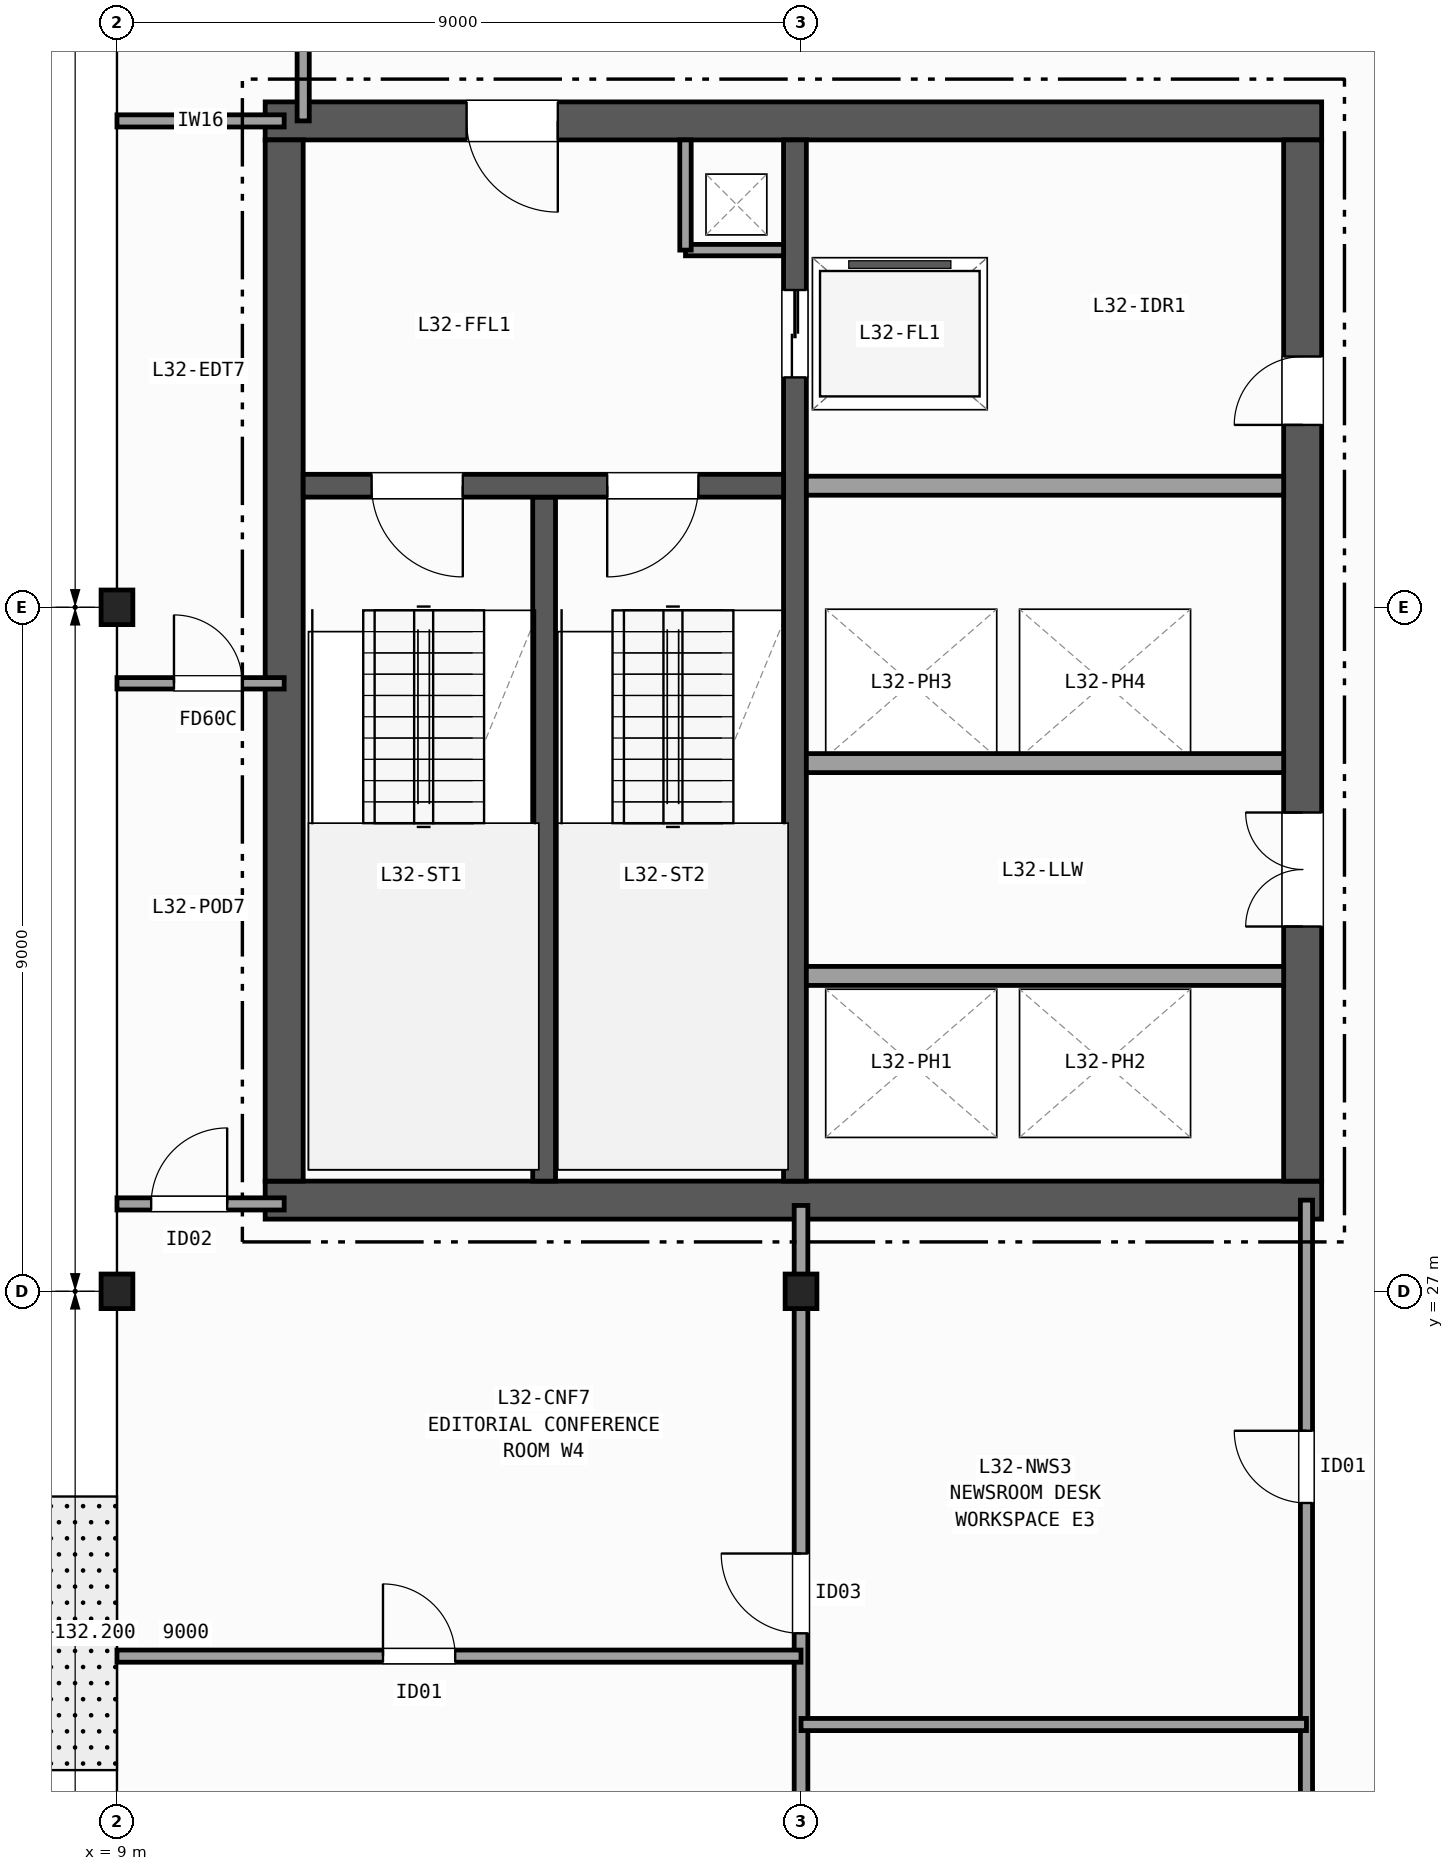
"""IFC4 building model, lengths in metres.
Left out: names, types, materials, properties, quantities, classifications, styles, units other than length and angle.
Written with IfcOpenShell. Run it as: python <this file> out.ifc"""

import sys

from ifc_helpers import new_model, si_unit, direction, frame, frame_2d, origin, origin_2d, place, context, subcontext, project, spatial, rectangle, i_section, extrude, element, fill, save


model = new_model("IFC4")
c1 = context("Model", 3, precision=1e-05, world=origin(), true_north=direction((0.0, 1.0)))
c2 = subcontext(c1, "Body", "Model", "MODEL_VIEW")
j1 = project(units=[si_unit("LENGTHUNIT", "METRE"), si_unit("PLANEANGLEUNIT", "RADIAN")], contexts=[c1])
p1 = place(None, origin())
s1 = spatial("IfcSite", under=j1, at=p1, CompositionType="ELEMENT")
p2 = place(p1, origin())
s2 = spatial("IfcBuilding", under=s1, at=p2, CompositionType="ELEMENT")
p3 = place(p2, frame((0.0, 0.0, 132.2)))
s3 = spatial("IfcBuildingStorey", under=s2, at=p3, CompositionType="ELEMENT", Elevation=132.2)
for number, where, z_axis, x_axis in (
    (1, (9.0, 27.0, 0.0), (0.0, 0.0, 1.0), (1.0, 0.0, 0.0)),
    (2, (9.0, 36.0, 0.0), (0.0, 0.0, 1.0), (1.0, 0.0, 0.0)),
    (3, (18.0, 27.0, 0.0), (0.0, 0.0, 1.0), (1.0, 0.0, 0.0)),
):
    element("IfcColumn", number, at=place(p3, frame(where, z_axis=z_axis, x_axis=x_axis)), inside=s3, PredefinedType="COLUMN", context=c2, shape_type="SweptSolid", body=[
        extrude(i_section(OverallWidth=0.418, OverallDepth=0.455, WebThickness=0.042, FlangeThickness=0.068, FilletRadius=0.015, at=origin_2d()), origin(), (0.0, 0.0, 1.0), 3.7),
    ])
p4 = place(p3, frame((10.95, 28.2, 0.0), z_axis=(0.0, 0.0, 1.0), x_axis=(1.0, 0.0, 0.0)))
e4 = element("IfcWall", 4, at=p4, inside=s3, PredefinedType="SHEAR", context=c2, shape_type="SweptSolid", body=[
    extrude(rectangle(XDim=13.9, YDim=0.5, at=frame_2d((6.95, 0.0))), origin(), (0.0, 0.0, 1.0), 3.42),
])
p5 = place(p3, frame((24.85, 42.4, 0.0), z_axis=(0.0, 0.0, 1.0), x_axis=(-1.0, 0.0, 0.0)))
e5 = element("IfcWall", 5, at=p5, inside=s3, PredefinedType="SHEAR", context=c2, shape_type="SweptSolid", body=[
    extrude(rectangle(XDim=13.9, YDim=0.5, at=frame_2d((6.95, 0.0))), origin(), (0.0, 0.0, 1.0), 3.42),
])
p6 = place(p5, frame((10.05, 0.0, 0.0)))
e6 = element("IfcOpeningElement", 6, at=p6, cuts=e5, PredefinedType="OPENING", context=c2, shape_type="SweptSolid", body=[
    extrude(rectangle(XDim=1.2, YDim=2.15, at=frame_2d((0.6, 1.075))), frame((0.0, 0.26, 0.0), z_axis=(0.0, -1.0, 0.0), x_axis=(1.0, 0.0, 0.0)), (0.0, 0.0, 1.0), 0.52),
])
p7 = place(p3, frame((11.2, 42.15, 0.0), z_axis=(0.0, 0.0, 1.0), x_axis=(0.0, -1.0, 0.0)))
e7 = element("IfcWall", 7, at=p7, inside=s3, PredefinedType="SHEAR", context=c2, shape_type="SweptSolid", body=[
    extrude(rectangle(XDim=13.7, YDim=0.5, at=frame_2d((6.85, 0.0))), origin(), (0.0, 0.0, 1.0), 3.42),
])
p8 = place(p3, frame((24.6, 28.45, 0.0), z_axis=(0.0, 0.0, 1.0), x_axis=(0.0, 1.0, 0.0)))
e8 = element("IfcWall", 8, at=p8, inside=s3, PredefinedType="SHEAR", context=c2, shape_type="SweptSolid", body=[
    extrude(rectangle(XDim=13.7, YDim=0.5, at=frame_2d((6.85, 0.0))), origin(), (0.0, 0.0, 1.0), 3.42),
])
p9 = place(p8, frame((3.35, 0.0, 0.0)))
e9 = element("IfcOpeningElement", 9, at=p9, cuts=e8, PredefinedType="OPENING", context=c2, shape_type="SweptSolid", body=[
    extrude(rectangle(XDim=1.5, YDim=2.2, at=frame_2d((0.75, 1.1))), frame((0.0, 0.26, 0.0), z_axis=(0.0, -1.0, 0.0), x_axis=(1.0, 0.0, 0.0)), (0.0, 0.0, 1.0), 0.52),
])
p10 = place(p8, frame((9.95, 0.0, 0.0)))
e10 = element("IfcOpeningElement", 10, at=p10, cuts=e8, PredefinedType="OPENING", context=c2, shape_type="SweptSolid", body=[
    extrude(rectangle(XDim=0.9, YDim=2.1, at=frame_2d((0.45, 1.05))), frame((0.0, 0.26, 0.0), z_axis=(0.0, -1.0, 0.0), x_axis=(1.0, 0.0, 0.0)), (0.0, 0.0, 1.0), 0.52),
])
p11 = place(p3, frame((14.62, 28.45, 0.0), z_axis=(0.0, 0.0, 1.0), x_axis=(0.0, 1.0, 0.0)))
e11 = element("IfcWall", 11, at=p11, inside=s3, PredefinedType="SHEAR", context=c2, shape_type="SweptSolid", body=[
    extrude(rectangle(XDim=9.0, YDim=0.3, at=frame_2d((4.5, 0.0))), origin(), (0.0, 0.0, 1.0), 3.42),
])
p12 = place(p3, frame((17.92, 42.15, 0.0), z_axis=(0.0, 0.0, 1.0), x_axis=(0.0, -1.0, 0.0)))
e12 = element("IfcWall", 12, at=p12, inside=s3, PredefinedType="SHEAR", context=c2, shape_type="SweptSolid", body=[
    extrude(rectangle(XDim=13.7, YDim=0.3, at=frame_2d((6.85, 0.0))), origin(), (0.0, 0.0, 1.0), 3.42),
])
p13 = place(p12, frame((1.975, 0.0, 0.0)))
e13 = element("IfcOpeningElement", 13, at=p13, cuts=e12, PredefinedType="OPENING", context=c2, shape_type="SweptSolid", body=[
    extrude(rectangle(XDim=1.15, YDim=2.15, at=frame_2d((0.575, 1.075))), frame((0.0, 0.16, 0.0), z_axis=(0.0, -1.0, 0.0), x_axis=(1.0, 0.0, 0.0)), (0.0, 0.0, 1.0), 0.32),
])
p14 = place(p3, frame((17.77, 37.6, 0.0), z_axis=(0.0, 0.0, 1.0), x_axis=(-1.0, 0.0, 0.0)))
e14 = element("IfcWall", 14, at=p14, inside=s3, PredefinedType="SHEAR", context=c2, shape_type="SweptSolid", body=[
    extrude(rectangle(XDim=6.32, YDim=0.3, at=frame_2d((3.16, 0.0))), origin(), (0.0, 0.0, 1.0), 3.42),
])
p15 = place(p14, frame((4.22, 0.0, 0.0)))
e15 = element("IfcOpeningElement", 15, at=p15, cuts=e14, PredefinedType="OPENING", context=c2, shape_type="SweptSolid", body=[
    extrude(rectangle(XDim=1.2, YDim=2.15, at=frame_2d((0.6, 1.075))), frame((0.0, 0.16, 0.0), z_axis=(0.0, -1.0, 0.0), x_axis=(1.0, 0.0, 0.0)), (0.0, 0.0, 1.0), 0.32),
])
p16 = place(p14, frame((1.12, 0.0, 0.0)))
e16 = element("IfcOpeningElement", 16, at=p16, cuts=e14, PredefinedType="OPENING", context=c2, shape_type="SweptSolid", body=[
    extrude(rectangle(XDim=1.2, YDim=2.15, at=frame_2d((0.6, 1.075))), frame((0.0, 0.16, 0.0), z_axis=(0.0, -1.0, 0.0), x_axis=(1.0, 0.0, 0.0)), (0.0, 0.0, 1.0), 0.32),
])
p17 = place(p3, frame((16.48, 40.7, 0.0), z_axis=(0.0, 0.0, 1.0), x_axis=(1.0, 0.0, 0.0)))
e17 = element("IfcWall", 17, at=p17, inside=s3, PredefinedType="PARTITIONING", context=c2, shape_type="SweptSolid", body=[
    extrude(rectangle(XDim=1.29, YDim=0.15, at=frame_2d((0.645, 0.0))), origin(), (0.0, 0.0, 1.0), 3.42),
])
p18 = place(p3, frame((16.48, 40.7, 0.0), z_axis=(0.0, 0.0, 1.0), x_axis=(0.0, 1.0, 0.0)))
e18 = element("IfcWall", 18, at=p18, inside=s3, PredefinedType="PARTITIONING", context=c2, shape_type="SweptSolid", body=[
    extrude(rectangle(XDim=1.45, YDim=0.15, at=frame_2d((0.725, 0.0))), origin(), (0.0, 0.0, 1.0), 3.42),
])
for number, where, z_axis, x_axis in (
    (19, (18.07, 37.6, 0.0), (0.0, 0.0, 1.0), (1.0, 0.0, 0.0)),
    (20, (18.07, 31.15, 0.0), (0.0, 0.0, 1.0), (1.0, 0.0, 0.0)),
    (21, (24.35, 33.95, 0.0), (0.0, 0.0, 1.0), (-1.0, 0.0, 0.0)),
):
    element("IfcWall", number, at=place(p3, frame(where, z_axis=z_axis, x_axis=x_axis)), inside=s3, PredefinedType="PARTITIONING", context=c2, shape_type="SweptSolid", body=[
        extrude(rectangle(XDim=6.28, YDim=0.25, at=frame_2d((3.14, 0.0))), origin(), (0.0, 0.0, 1.0), 3.42),
    ])
p19 = place(p3, frame((9.0, 28.15, 0.0), z_axis=(0.0, 0.0, 1.0), x_axis=(1.0, 0.0, 0.0)))
e22 = element("IfcWall", 22, at=p19, inside=s3, PredefinedType="PARTITIONING", context=c2, shape_type="SweptSolid", body=[
    extrude(rectangle(XDim=2.2, YDim=0.16, at=frame_2d((1.1, 0.0))), origin(), (0.0, 0.0, 1.0), 2.634),
])
p20 = place(p19, frame((0.45, 0.0, 0.0)))
e23 = element("IfcOpeningElement", 23, at=p20, cuts=e22, PredefinedType="OPENING", context=c2, shape_type="SweptSolid", body=[
    extrude(rectangle(XDim=1.0, YDim=2.1, at=frame_2d((0.5, 1.05))), frame((0.0, 0.09, 0.0), z_axis=(0.0, -1.0, 0.0), x_axis=(1.0, 0.0, 0.0)), (0.0, 0.0, 1.0), 0.18),
])
p21 = place(p3, frame((9.0, 42.4, 0.0), z_axis=(0.0, 0.0, 1.0), x_axis=(1.0, 0.0, 0.0)))
e24 = element("IfcWall", 24, at=p21, inside=s3, PredefinedType="PARTITIONING", context=c2, shape_type="SweptSolid", body=[
    extrude(rectangle(XDim=2.2, YDim=0.16, at=frame_2d((1.1, 0.0))), origin(), (0.0, 0.0, 1.0), 2.634),
])
p22 = place(p3, frame((11.45, 42.4, 0.0), z_axis=(0.0, 0.0, 1.0), x_axis=(0.0, 1.0, 0.0)))
e25 = element("IfcWall", 25, at=p22, inside=s3, PredefinedType="PARTITIONING", context=c2, shape_type="SweptSolid", body=[
    extrude(rectangle(XDim=2.1, YDim=0.16, at=frame_2d((1.05, 0.0))), origin(), (0.0, 0.0, 1.0), 3.42),
])
p23 = place(p3, frame((9.0, 35.0, 0.0), z_axis=(0.0, 0.0, 1.0), x_axis=(1.0, 0.0, 0.0)))
e26 = element("IfcWall", 26, at=p23, inside=s3, PredefinedType="PARTITIONING", context=c2, shape_type="SweptSolid", body=[
    extrude(rectangle(XDim=2.2, YDim=0.15, at=frame_2d((1.1, 0.0))), origin(), (0.0, 0.0, 1.0), 2.634),
])
p24 = place(p23, frame((0.75, 0.0, 0.0)))
e27 = element("IfcOpeningElement", 27, at=p24, cuts=e26, PredefinedType="OPENING", context=c2, shape_type="SweptSolid", body=[
    extrude(rectangle(XDim=0.9, YDim=2.1, at=frame_2d((0.45, 1.05))), frame((0.0, 0.085, 0.0), z_axis=(0.0, -1.0, 0.0), x_axis=(1.0, 0.0, 0.0)), (0.0, 0.0, 1.0), 0.17),
])
p25 = place(p3, frame((24.65, 9.0, 0.0), z_axis=(0.0, 0.0, 1.0), x_axis=(0.0, 1.0, 0.0)))
e28 = element("IfcWall", 28, at=p25, inside=s3, PredefinedType="PARTITIONING", context=c2, shape_type="SweptSolid", body=[
    extrude(rectangle(XDim=19.2, YDim=0.16, at=frame_2d((9.6, 0.0))), origin(), (0.0, 0.0, 1.0), 2.634),
])
p26 = place(p25, frame((2.0, 0.0, 0.0)))
e29 = element("IfcOpeningElement", 29, at=p26, cuts=e28, PredefinedType="OPENING", context=c2, shape_type="SweptSolid", body=[
    extrude(rectangle(XDim=1.2, YDim=2.15, at=frame_2d((0.6, 1.075))), frame((0.0, 0.09, 0.0), z_axis=(0.0, -1.0, 0.0), x_axis=(1.0, 0.0, 0.0)), (0.0, 0.0, 1.0), 0.18),
])
p27 = place(p25, frame((8.15, 0.0, 0.0)))
e30 = element("IfcOpeningElement", 30, at=p27, cuts=e28, PredefinedType="OPENING", context=c2, shape_type="SweptSolid", body=[
    extrude(rectangle(XDim=0.86, YDim=2.05, at=frame_2d((0.43, 1.025))), frame((0.0, 0.09, 0.0), z_axis=(0.0, -1.0, 0.0), x_axis=(1.0, 0.0, 0.0)), (0.0, 0.0, 1.0), 0.18),
])
p28 = place(p25, frame((15.215, 0.0, 0.0)))
e31 = element("IfcOpeningElement", 31, at=p28, cuts=e28, PredefinedType="OPENING", context=c2, shape_type="SweptSolid", body=[
    extrude(rectangle(XDim=0.95, YDim=2.1, at=frame_2d((0.475, 1.05))), frame((0.0, 0.09, 0.0), z_axis=(0.0, -1.0, 0.0), x_axis=(1.0, 0.0, 0.0)), (0.0, 0.0, 1.0), 0.18),
])
p29 = place(p3, frame((18.0, 9.0, 0.0), z_axis=(0.0, 0.0, 1.0), x_axis=(0.0, 1.0, 0.0)))
e32 = element("IfcWall", 32, at=p29, inside=s3, PredefinedType="PARTITIONING", context=c2, shape_type="SweptSolid", body=[
    extrude(rectangle(XDim=19.13, YDim=0.18, at=frame_2d((9.565, 0.0))), origin(), (0.0, 0.0, 1.0), 2.634),
])
p30 = place(p29, frame((2.2, 0.0, 0.0)))
e33 = element("IfcOpeningElement", 33, at=p30, cuts=e32, PredefinedType="OPENING", context=c2, shape_type="SweptSolid", body=[
    extrude(rectangle(XDim=1.0, YDim=2.1, at=frame_2d((0.5, 1.05))), frame((0.0, 0.1, 0.0), z_axis=(0.0, -1.0, 0.0), x_axis=(1.0, 0.0, 0.0)), (0.0, 0.0, 1.0), 0.2),
])
p31 = place(p29, frame((13.5, 0.0, 0.0)))
e34 = element("IfcOpeningElement", 34, at=p31, cuts=e32, PredefinedType="OPENING", context=c2, shape_type="SweptSolid", body=[
    extrude(rectangle(XDim=1.05, YDim=2.15, at=frame_2d((0.525, 1.075))), frame((0.0, 0.1, 0.0), z_axis=(0.0, -1.0, 0.0), x_axis=(1.0, 0.0, 0.0)), (0.0, 0.0, 1.0), 0.2),
])
p32 = place(p3, frame((18.0, 21.3, 0.0), z_axis=(0.0, 0.0, 1.0), x_axis=(1.0, 0.0, 0.0)))
e35 = element("IfcWall", 35, at=p32, inside=s3, PredefinedType="PARTITIONING", context=c2, shape_type="SweptSolid", body=[
    extrude(rectangle(XDim=6.65, YDim=0.16, at=frame_2d((3.325, 0.0))), origin(), (0.0, 0.0, 1.0), 2.792),
])
p33 = place(p3, frame((9.0, 22.2, 0.0), z_axis=(0.0, 0.0, 1.0), x_axis=(1.0, 0.0, 0.0)))
e36 = element("IfcWall", 36, at=p33, inside=s3, PredefinedType="PARTITIONING", context=c2, shape_type="SweptSolid", body=[
    extrude(rectangle(XDim=9.0, YDim=0.16, at=frame_2d((4.5, 0.0))), origin(), (0.0, 0.0, 1.0), 2.634),
])
p34 = place(p33, frame((3.5, 0.0, 0.0)))
e37 = element("IfcOpeningElement", 37, at=p34, cuts=e36, PredefinedType="OPENING", context=c2, shape_type="SweptSolid", body=[
    extrude(rectangle(XDim=0.95, YDim=2.1, at=frame_2d((0.475, 1.05))), frame((0.0, 0.09, 0.0), z_axis=(0.0, -1.0, 0.0), x_axis=(1.0, 0.0, 0.0)), (0.0, 0.0, 1.0), 0.18),
])
p35 = place(p15, origin())
e38 = element("IfcDoor", 38, at=p35, inside=s3, OperationType="SINGLE_SWING_LEFT", PredefinedType="DOOR", context=c2, shape_type="SweptSolid", body=[
    extrude(rectangle(XDim=1.2, YDim=2.15, at=frame_2d((0.6, 1.075))), frame((0.0, 0.025, 0.0), z_axis=(0.0, -1.0, 0.0), x_axis=(1.0, 0.0, 0.0)), (0.0, 0.0, 1.0), 0.05),
])
fill(e15, e38)
p36 = place(p16, origin())
e39 = element("IfcDoor", 39, at=p36, inside=s3, OperationType="SINGLE_SWING_RIGHT", PredefinedType="DOOR", context=c2, shape_type="SweptSolid", body=[
    extrude(rectangle(XDim=1.2, YDim=2.15, at=frame_2d((0.6, 1.075))), frame((0.0, 0.025, 0.0), z_axis=(0.0, -1.0, 0.0), x_axis=(1.0, 0.0, 0.0)), (0.0, 0.0, 1.0), 0.05),
])
fill(e16, e39)
p37 = place(p9, origin())
e40 = element("IfcDoor", 40, at=p37, inside=s3, OperationType="DOUBLE_DOOR_SINGLE_SWING", PredefinedType="DOOR", context=c2, shape_type="SweptSolid", body=[
    extrude(rectangle(XDim=1.5, YDim=2.2, at=frame_2d((0.75, 1.1))), frame((0.0, 0.025, 0.0), z_axis=(0.0, -1.0, 0.0), x_axis=(1.0, 0.0, 0.0)), (0.0, 0.0, 1.0), 0.05),
])
fill(e9, e40)
p38 = place(p6, origin())
e41 = element("IfcDoor", 41, at=p38, inside=s3, OperationType="SINGLE_SWING_LEFT", PredefinedType="DOOR", context=c2, shape_type="SweptSolid", body=[
    extrude(rectangle(XDim=1.2, YDim=2.15, at=frame_2d((0.6, 1.075))), frame((0.0, 0.025, 0.0), z_axis=(0.0, -1.0, 0.0), x_axis=(1.0, 0.0, 0.0)), (0.0, 0.0, 1.0), 0.05),
])
fill(e6, e41)
p39 = place(p10, origin())
e42 = element("IfcDoor", 42, at=p39, inside=s3, OperationType="SINGLE_SWING_LEFT", PredefinedType="DOOR", context=c2, shape_type="SweptSolid", body=[
    extrude(rectangle(XDim=0.9, YDim=2.1, at=frame_2d((0.45, 1.05))), frame((0.0, 0.025, 0.0), z_axis=(0.0, -1.0, 0.0), x_axis=(1.0, 0.0, 0.0)), (0.0, 0.0, 1.0), 0.05),
])
fill(e10, e42)
p40 = place(p13, origin())
e43 = element("IfcDoor", 43, at=p40, inside=s3, OperationType="DOUBLE_DOOR_SLIDING", PredefinedType="DOOR", context=c2, shape_type="SweptSolid", body=[
    extrude(rectangle(XDim=1.15, YDim=2.15, at=frame_2d((0.575, 1.075))), frame((0.0, 0.025, 0.0), z_axis=(0.0, -1.0, 0.0), x_axis=(1.0, 0.0, 0.0)), (0.0, 0.0, 1.0), 0.05),
])
fill(e13, e43)
p41 = place(p20, origin())
e44 = element("IfcDoor", 44, at=p41, inside=s3, OperationType="SINGLE_SWING_RIGHT", PredefinedType="DOOR", context=c2, shape_type="SweptSolid", body=[
    extrude(rectangle(XDim=1.0, YDim=2.1, at=frame_2d((0.5, 1.05))), frame((0.0, 0.025, 0.0), z_axis=(0.0, -1.0, 0.0), x_axis=(1.0, 0.0, 0.0)), (0.0, 0.0, 1.0), 0.05),
])
fill(e23, e44)
p42 = place(p24, origin())
e45 = element("IfcDoor", 45, at=p42, inside=s3, OperationType="SINGLE_SWING_LEFT", PredefinedType="DOOR", context=c2, shape_type="SweptSolid", body=[
    extrude(rectangle(XDim=0.9, YDim=2.1, at=frame_2d((0.45, 1.05))), frame((0.0, 0.025, 0.0), z_axis=(0.0, -1.0, 0.0), x_axis=(1.0, 0.0, 0.0)), (0.0, 0.0, 1.0), 0.05),
])
fill(e27, e45)
p43 = place(p28, origin())
e46 = element("IfcDoor", 46, at=p43, inside=s3, OperationType="SINGLE_SWING_RIGHT", PredefinedType="DOOR", context=c2, shape_type="SweptSolid", body=[
    extrude(rectangle(XDim=0.95, YDim=2.1, at=frame_2d((0.475, 1.05))), frame((0.0, 0.025, 0.0), z_axis=(0.0, -1.0, 0.0), x_axis=(1.0, 0.0, 0.0)), (0.0, 0.0, 1.0), 0.05),
])
fill(e31, e46)
p44 = place(p31, origin())
e47 = element("IfcDoor", 47, at=p44, inside=s3, OperationType="SINGLE_SWING_RIGHT", PredefinedType="DOOR", context=c2, shape_type="SweptSolid", body=[
    extrude(rectangle(XDim=1.05, YDim=2.15, at=frame_2d((0.525, 1.075))), frame((0.0, 0.025, 0.0), z_axis=(0.0, -1.0, 0.0), x_axis=(1.0, 0.0, 0.0)), (0.0, 0.0, 1.0), 0.05),
])
fill(e34, e47)
p45 = place(p34, origin())
e48 = element("IfcDoor", 48, at=p45, inside=s3, OperationType="SINGLE_SWING_LEFT", PredefinedType="DOOR", context=c2, shape_type="SweptSolid", body=[
    extrude(rectangle(XDim=0.95, YDim=2.1, at=frame_2d((0.475, 1.05))), frame((0.0, 0.025, 0.0), z_axis=(0.0, -1.0, 0.0), x_axis=(1.0, 0.0, 0.0)), (0.0, 0.0, 1.0), 0.05),
])
fill(e37, e48)
save(model, sys.argv[1])
